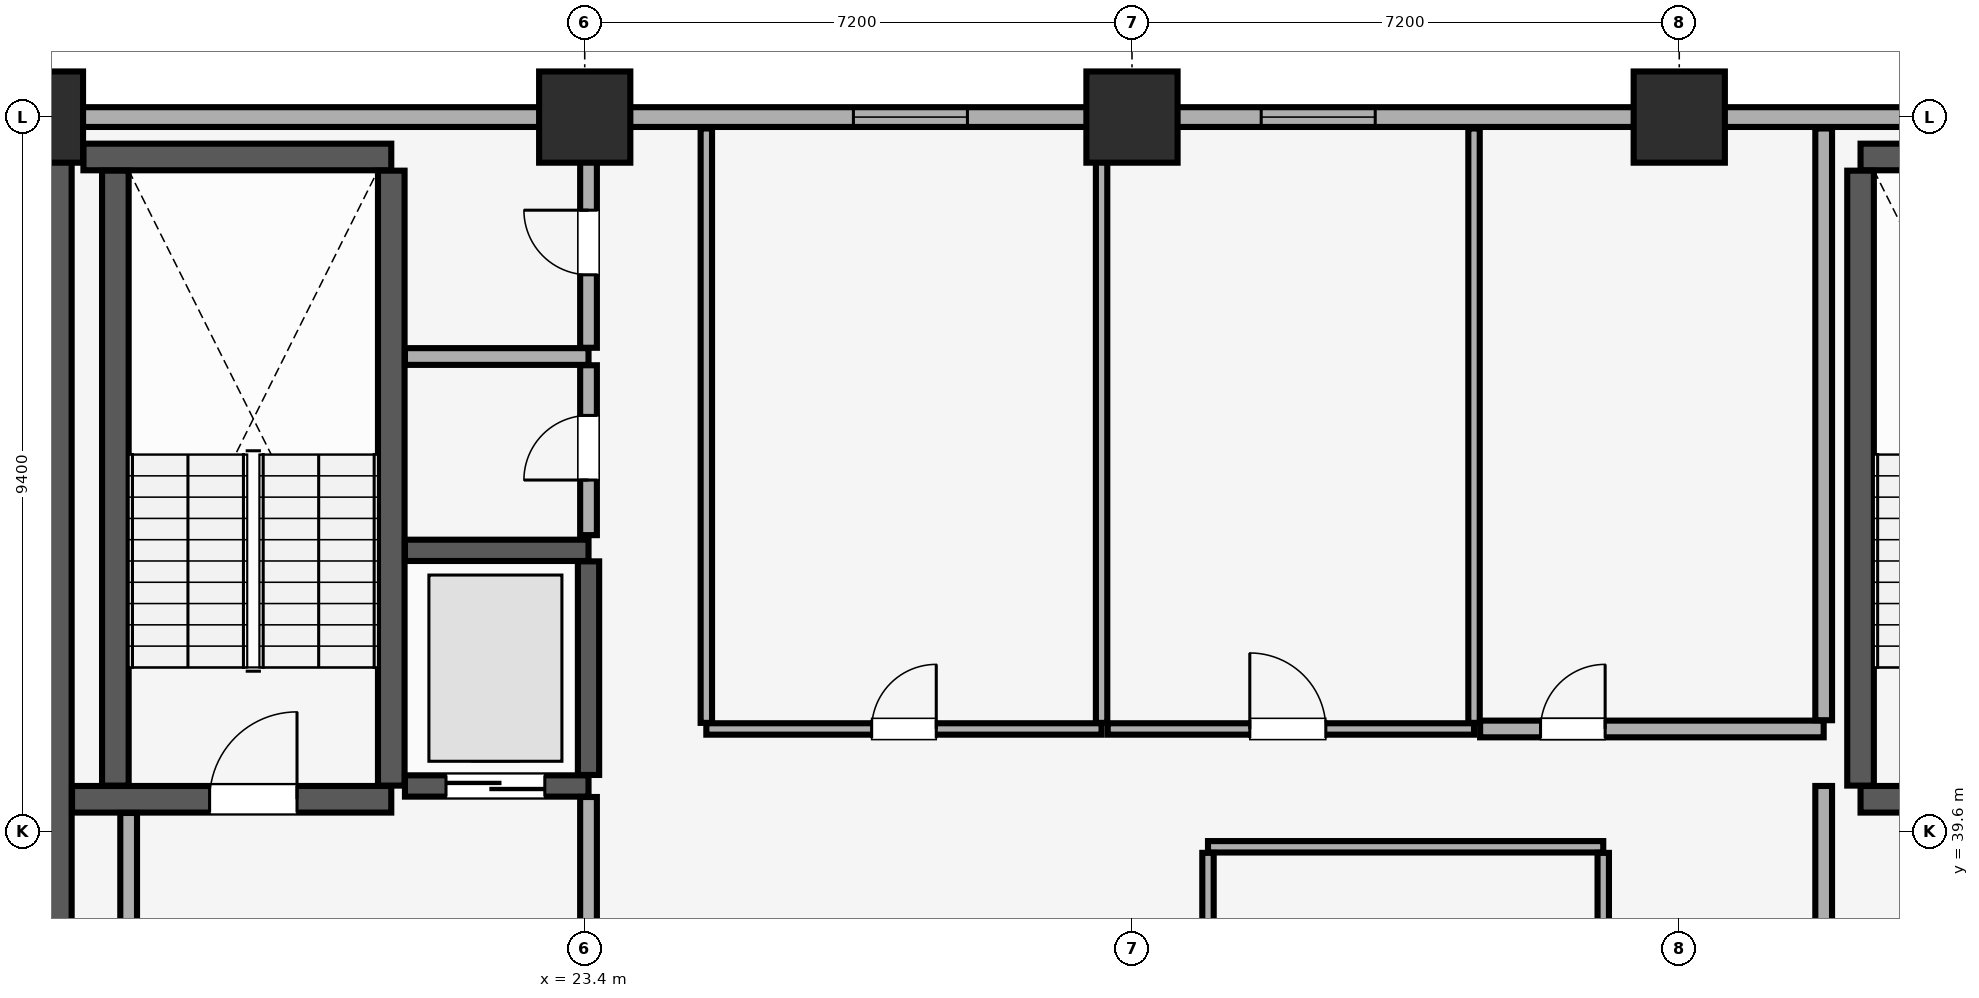
"""IFC4 building model, lengths in metres.
Left out: names, types, materials, properties, quantities, classifications, styles, units other than length and angle.
Written with IfcOpenShell. Run it as: python <this file> out.ifc"""

import sys

from ifc_helpers import new_model, si_unit, direction, frame, frame_2d, origin, origin_2d, place, context, subcontext, project, spatial, rectangle, extrude, element, fill, save


model = new_model("IFC4")
c1 = context("Model", 3, precision=1e-05, world=origin(), true_north=direction((0.0, 1.0)))
c2 = subcontext(c1, "Body", "Model", "MODEL_VIEW")
j1 = project(units=[si_unit("LENGTHUNIT", "METRE"), si_unit("PLANEANGLEUNIT", "RADIAN")], contexts=[c1])
p1 = place(None, origin())
s1 = spatial("IfcSite", under=j1, at=p1, CompositionType="ELEMENT")
p2 = place(p1, origin())
s2 = spatial("IfcBuilding", under=s1, at=p2, CompositionType="ELEMENT")
p3 = place(p2, frame((0.0, 0.0, 104.3)))
s3 = spatial("IfcBuildingStorey", under=s2, at=p3, CompositionType="ELEMENT", Elevation=104.3)
for number, where, z_axis, x_axis in (
    (1, (16.2, 49.0, 0.0), (0.0, 0.0, 1.0), (1.0, 0.0, 0.0)),
    (2, (23.4, 49.0, 0.0), (0.0, 0.0, 1.0), (1.0, 0.0, 0.0)),
    (3, (30.6, 49.0, 0.0), (0.0, 0.0, 1.0), (1.0, 0.0, 0.0)),
    (4, (37.8, 49.0, 0.0), (0.0, 0.0, 1.0), (1.0, 0.0, 0.0)),
):
    element("IfcColumn", number, at=place(p3, frame(where, z_axis=z_axis, x_axis=x_axis)), inside=s3, PredefinedType="COLUMN", context=c2, shape_type="SweptSolid", body=[
        extrude(rectangle(XDim=1.2, YDim=1.2, at=origin_2d()), origin(), (0.0, 0.0, 1.0), 3.51),
    ])
p4 = place(p3, frame((79.8, 49.0, 0.0), z_axis=(0.0, 0.0, 1.0), x_axis=(-1.0, 0.0, 0.0)))
e5 = element("IfcWall", 5, at=p4, inside=s3, PredefinedType="SOLIDWALL", context=c2, shape_type="SweptSolid", body=[
    extrude(rectangle(XDim=75.6, YDim=0.26, at=frame_2d((37.8, 0.0))), origin(), (0.0, 0.0, 1.0), 2.56),
])
p5 = place(p4, frame((72.565, 0.0, 0.85)))
e6 = element("IfcOpeningElement", 6, at=p5, cuts=e5, PredefinedType="OPENING", context=c2, shape_type="SweptSolid", body=[
    extrude(rectangle(XDim=1.5, YDim=1.4, at=frame_2d((0.75, 0.7))), frame((0.0, 0.14, 0.0), z_axis=(0.0, -1.0, 0.0), x_axis=(1.0, 0.0, 0.0)), (0.0, 0.0, 1.0), 0.28),
])
p6 = place(p4, frame((67.45, 0.0, 0.85)))
e7 = element("IfcOpeningElement", 7, at=p6, cuts=e5, PredefinedType="OPENING", context=c2, shape_type="SweptSolid", body=[
    extrude(rectangle(XDim=1.5, YDim=1.4, at=frame_2d((0.75, 0.7))), frame((0.0, 0.14, 0.0), z_axis=(0.0, -1.0, 0.0), x_axis=(1.0, 0.0, 0.0)), (0.0, 0.0, 1.0), 0.28),
])
p7 = place(p4, frame((6.65, 0.0, 0.85)))
e8 = element("IfcOpeningElement", 8, at=p7, cuts=e5, PredefinedType="OPENING", context=c2, shape_type="SweptSolid", body=[
    extrude(rectangle(XDim=1.5, YDim=1.4, at=frame_2d((0.75, 0.7))), frame((0.0, 0.14, 0.0), z_axis=(0.0, -1.0, 0.0), x_axis=(1.0, 0.0, 0.0)), (0.0, 0.0, 1.0), 0.28),
])
p8 = place(p4, frame((1.535, 0.0, 0.85)))
e9 = element("IfcOpeningElement", 9, at=p8, cuts=e5, PredefinedType="OPENING", context=c2, shape_type="SweptSolid", body=[
    extrude(rectangle(XDim=1.5, YDim=1.4, at=frame_2d((0.75, 0.7))), frame((0.0, 0.14, 0.0), z_axis=(0.0, -1.0, 0.0), x_axis=(1.0, 0.0, 0.0)), (0.0, 0.0, 1.0), 0.28),
])
p9 = place(p4, frame((51.365, 0.0, 0.9)))
e10 = element("IfcOpeningElement", 10, at=p9, cuts=e5, PredefinedType="OPENING", context=c2, shape_type="SweptSolid", body=[
    extrude(rectangle(XDim=1.5, YDim=1.4, at=frame_2d((0.75, 0.7))), frame((0.0, 0.14, 0.0), z_axis=(0.0, -1.0, 0.0), x_axis=(1.0, 0.0, 0.0)), (0.0, 0.0, 1.0), 0.28),
])
p10 = place(p4, frame((46.0, 0.0, 0.9)))
e11 = element("IfcOpeningElement", 11, at=p10, cuts=e5, PredefinedType="OPENING", context=c2, shape_type="SweptSolid", body=[
    extrude(rectangle(XDim=1.5, YDim=1.4, at=frame_2d((0.75, 0.7))), frame((0.0, 0.14, 0.0), z_axis=(0.0, -1.0, 0.0), x_axis=(1.0, 0.0, 0.0)), (0.0, 0.0, 1.0), 0.28),
])
p11 = place(p4, frame((29.15, 0.0, 0.9)))
e12 = element("IfcOpeningElement", 12, at=p11, cuts=e5, PredefinedType="OPENING", context=c2, shape_type="SweptSolid", body=[
    extrude(rectangle(XDim=1.5, YDim=1.4, at=frame_2d((0.75, 0.7))), frame((0.0, 0.14, 0.0), z_axis=(0.0, -1.0, 0.0), x_axis=(1.0, 0.0, 0.0)), (0.0, 0.0, 1.0), 0.28),
])
p12 = place(p4, frame((23.485, 0.0, 0.9)))
e13 = element("IfcOpeningElement", 13, at=p12, cuts=e5, PredefinedType="OPENING", context=c2, shape_type="SweptSolid", body=[
    extrude(rectangle(XDim=1.5, YDim=1.4, at=frame_2d((0.75, 0.7))), frame((0.0, 0.14, 0.0), z_axis=(0.0, -1.0, 0.0), x_axis=(1.0, 0.0, 0.0)), (0.0, 0.0, 1.0), 0.28),
])
p13 = place(p3, frame((16.2, 29.4, 0.0), z_axis=(0.0, 0.0, 1.0), x_axis=(0.0, 1.0, 0.0)))
e14 = element("IfcWall", 14, at=p13, inside=s3, PredefinedType="SHEAR", context=c2, shape_type="SweptSolid", body=[
    extrude(rectangle(XDim=19.2, YDim=0.9, at=frame_2d((9.6, 0.0))), origin(), (0.0, 0.0, 1.0), 3.51),
])
p14 = place(p3, frame((16.655, 40.025, 0.0), z_axis=(0.0, 0.0, 1.0), x_axis=(1.0, 0.0, 0.0)))
e15 = element("IfcWall", 15, at=p14, inside=s3, PredefinedType="SHEAR", context=c2, shape_type="SweptSolid", body=[
    extrude(rectangle(XDim=4.2, YDim=0.35, at=frame_2d((2.1, 0.0))), origin(), (0.0, 0.0, 1.0), 3.51),
])
p15 = place(p14, frame((1.81, 0.0, 0.0)))
e16 = element("IfcOpeningElement", 16, at=p15, cuts=e15, PredefinedType="OPENING", context=c2, shape_type="SweptSolid", body=[
    extrude(rectangle(XDim=1.15, YDim=2.15, at=frame_2d((0.575, 1.075))), frame((0.0, 0.185, 0.0), z_axis=(0.0, -1.0, 0.0), x_axis=(1.0, 0.0, 0.0)), (0.0, 0.0, 1.0), 0.37),
])
p16 = place(p3, frame((16.805, 48.475, 0.0), z_axis=(0.0, 0.0, 1.0), x_axis=(1.0, 0.0, 0.0)))
e17 = element("IfcWall", 17, at=p16, inside=s3, PredefinedType="SHEAR", context=c2, shape_type="SweptSolid", body=[
    extrude(rectangle(XDim=4.05, YDim=0.35, at=frame_2d((2.025, 0.0))), origin(), (0.0, 0.0, 1.0), 3.51),
])
for number, where, z_axis, x_axis in (
    (18, (17.225, 40.205, 0.0), (0.0, 0.0, 1.0), (0.0, 1.0, 0.0)),
    (19, (20.855, 40.205, 0.0), (0.0, 0.0, 1.0), (0.0, 1.0, 0.0)),
):
    element("IfcWall", number, at=place(p3, frame(where, z_axis=z_axis, x_axis=x_axis)), inside=s3, PredefinedType="SHEAR", context=c2, shape_type="SweptSolid", body=[
        extrude(rectangle(XDim=8.09, YDim=0.35, at=frame_2d((4.045, 0.0))), origin(), (0.0, 0.0, 1.0), 3.51),
    ])
p17 = place(p3, frame((40.185, 40.025, 0.0), z_axis=(0.0, 0.0, 1.0), x_axis=(1.0, 0.0, 0.0)))
e20 = element("IfcWall", 20, at=p17, inside=s3, PredefinedType="SHEAR", context=c2, shape_type="SweptSolid", body=[
    extrude(rectangle(XDim=3.63, YDim=0.35, at=frame_2d((1.815, 0.0))), origin(), (0.0, 0.0, 1.0), 3.51),
])
p18 = place(p17, frame((1.24, 0.0, 0.0)))
e21 = element("IfcOpeningElement", 21, at=p18, cuts=e20, PredefinedType="OPENING", context=c2, shape_type="SweptSolid", body=[
    extrude(rectangle(XDim=1.15, YDim=2.15, at=frame_2d((0.575, 1.075))), frame((0.0, 0.185, 0.0), z_axis=(0.0, -1.0, 0.0), x_axis=(1.0, 0.0, 0.0)), (0.0, 0.0, 1.0), 0.37),
])
p19 = place(p3, frame((40.185, 48.475, 0.0), z_axis=(0.0, 0.0, 1.0), x_axis=(1.0, 0.0, 0.0)))
e22 = element("IfcWall", 22, at=p19, inside=s3, PredefinedType="SHEAR", context=c2, shape_type="SweptSolid", body=[
    extrude(rectangle(XDim=3.63, YDim=0.35, at=frame_2d((1.815, 0.0))), origin(), (0.0, 0.0, 1.0), 3.51),
])
p20 = place(p3, frame((40.185, 40.205, 0.0), z_axis=(0.0, 0.0, 1.0), x_axis=(0.0, 1.0, 0.0)))
e23 = element("IfcWall", 23, at=p20, inside=s3, PredefinedType="SHEAR", context=c2, shape_type="SweptSolid", body=[
    extrude(rectangle(XDim=8.09, YDim=0.35, at=frame_2d((4.045, 0.0))), origin(), (0.0, 0.0, 1.0), 3.51),
])
p21 = place(p3, frame((21.035, 40.2, 0.0), z_axis=(0.0, 0.0, 1.0), x_axis=(1.0, 0.0, 0.0)))
e24 = element("IfcWall", 24, at=p21, inside=s3, PredefinedType="SHEAR", context=c2, shape_type="SweptSolid", body=[
    extrude(rectangle(XDim=2.415, YDim=0.28, at=frame_2d((1.208, 0.0))), origin(), (0.0, 0.0, 1.0), 3.51),
])
p22 = place(p21, frame((0.54, 0.0, 0.0)))
e25 = element("IfcOpeningElement", 25, at=p22, cuts=e24, PredefinedType="OPENING", context=c2, shape_type="SweptSolid", body=[
    extrude(rectangle(XDim=1.3, YDim=2.3, at=frame_2d((0.65, 1.15))), frame((0.0, 0.15, 0.0), z_axis=(0.0, -1.0, 0.0), x_axis=(1.0, 0.0, 0.0)), (0.0, 0.0, 1.0), 0.3),
])
p23 = place(p3, frame((21.035, 43.3, 0.0), z_axis=(0.0, 0.0, 1.0), x_axis=(1.0, 0.0, 0.0)))
e26 = element("IfcWall", 26, at=p23, inside=s3, PredefinedType="SHEAR", context=c2, shape_type="SweptSolid", body=[
    extrude(rectangle(XDim=2.415, YDim=0.28, at=frame_2d((1.208, 0.0))), origin(), (0.0, 0.0, 1.0), 3.51),
])
p24 = place(p3, frame((23.45, 40.345, 0.0), z_axis=(0.0, 0.0, 1.0), x_axis=(0.0, 1.0, 0.0)))
e27 = element("IfcWall", 27, at=p24, inside=s3, PredefinedType="SHEAR", context=c2, shape_type="SweptSolid", body=[
    extrude(rectangle(XDim=2.81, YDim=0.28, at=frame_2d((1.405, 0.0))), origin(), (0.0, 0.0, 1.0), 3.51),
])
p25 = place(p3, frame((17.4, 34.415, 0.0), z_axis=(0.0, 0.0, 1.0), x_axis=(0.0, 1.0, 0.0)))
e28 = element("IfcWall", 28, at=p25, inside=s3, PredefinedType="PARTITIONING", context=c2, shape_type="SweptSolid", body=[
    extrude(rectangle(XDim=5.43, YDim=0.22, at=frame_2d((2.715, 0.0))), origin(), (0.0, 0.0, 1.0), 3.51),
])
p26 = place(p3, frame((23.45, 34.415, 0.0), z_axis=(0.0, 0.0, 1.0), x_axis=(0.0, 1.0, 0.0)))
e29 = element("IfcWall", 29, at=p26, inside=s3, PredefinedType="PARTITIONING", context=c2, shape_type="SweptSolid", body=[
    extrude(rectangle(XDim=5.64, YDim=0.22, at=frame_2d((2.82, 0.0))), origin(), (0.0, 0.0, 1.0), 3.51),
])
p27 = place(p3, frame((39.7, 34.415, 0.0), z_axis=(0.0, 0.0, 1.0), x_axis=(0.0, 1.0, 0.0)))
e30 = element("IfcWall", 30, at=p27, inside=s3, PredefinedType="PARTITIONING", context=c2, shape_type="SweptSolid", body=[
    extrude(rectangle(XDim=5.785, YDim=0.22, at=frame_2d((2.893, 0.0))), origin(), (0.0, 0.0, 1.0), 3.51),
])
p28 = place(p3, frame((21.035, 45.85, 0.0), z_axis=(0.0, 0.0, 1.0), x_axis=(1.0, 0.0, 0.0)))
e31 = element("IfcWall", 31, at=p28, inside=s3, PredefinedType="PARTITIONING", context=c2, shape_type="SweptSolid", body=[
    extrude(rectangle(XDim=2.415, YDim=0.22, at=frame_2d((1.208, 0.0))), origin(), (0.0, 0.0, 1.0), 3.51),
])
p29 = place(p3, frame((23.45, 43.5, 0.0), z_axis=(0.0, 0.0, 1.0), x_axis=(0.0, 1.0, 0.0)))
e32 = element("IfcWall", 32, at=p29, inside=s3, PredefinedType="PARTITIONING", context=c2, shape_type="SweptSolid", body=[
    extrude(rectangle(XDim=2.235, YDim=0.22, at=frame_2d((1.118, 0.0))), origin(), (0.0, 0.0, 1.0), 3.51),
])
p30 = place(p29, frame((0.725, 0.0, 0.0)))
e33 = element("IfcOpeningElement", 33, at=p30, cuts=e32, PredefinedType="OPENING", context=c2, shape_type="SweptSolid", body=[
    extrude(rectangle(XDim=0.85, YDim=2.1, at=frame_2d((0.425, 1.05))), frame((0.0, 0.12, 0.0), z_axis=(0.0, -1.0, 0.0), x_axis=(1.0, 0.0, 0.0)), (0.0, 0.0, 1.0), 0.24),
])
p31 = place(p3, frame((23.45, 45.965, 0.0), z_axis=(0.0, 0.0, 1.0), x_axis=(0.0, 1.0, 0.0)))
e34 = element("IfcWall", 34, at=p31, inside=s3, PredefinedType="PARTITIONING", context=c2, shape_type="SweptSolid", body=[
    extrude(rectangle(XDim=2.885, YDim=0.22, at=frame_2d((1.442, 0.0))), origin(), (0.0, 0.0, 1.0), 3.51),
])
p32 = place(p31, frame((0.96, 0.0, 0.0)))
e35 = element("IfcOpeningElement", 35, at=p32, cuts=e34, PredefinedType="OPENING", context=c2, shape_type="SweptSolid", body=[
    extrude(rectangle(XDim=0.85, YDim=2.1, at=frame_2d((0.425, 1.05))), frame((0.0, 0.12, 0.0), z_axis=(0.0, -1.0, 0.0), x_axis=(1.0, 0.0, 0.0)), (0.0, 0.0, 1.0), 0.24),
])
p33 = place(p3, frame((31.6, 39.4, 0.0), z_axis=(0.0, 0.0, 1.0), x_axis=(1.0, 0.0, 0.0)))
e36 = element("IfcWall", 36, at=p33, inside=s3, PredefinedType="PARTITIONING", context=c2, shape_type="SweptSolid", body=[
    extrude(rectangle(XDim=5.2, YDim=0.15, at=frame_2d((2.6, 0.0))), origin(), (0.0, 0.0, 1.0), 3.51),
])
for number, where, z_axis, x_axis in (
    (37, (31.6, 34.38, 0.0), (0.0, 0.0, 1.0), (0.0, 1.0, 0.0)),
    (38, (36.8, 34.38, 0.0), (0.0, 0.0, 1.0), (0.0, 1.0, 0.0)),
):
    element("IfcWall", number, at=place(p3, frame(where, z_axis=z_axis, x_axis=x_axis)), inside=s3, PredefinedType="PARTITIONING", context=c2, shape_type="SweptSolid", body=[
        extrude(rectangle(XDim=4.94, YDim=0.15, at=frame_2d((2.47, 0.0))), origin(), (0.0, 0.0, 1.0), 3.51),
    ])
p34 = place(p3, frame((25.0, 40.95, 0.0), z_axis=(0.0, 0.0, 1.0), x_axis=(1.0, 0.0, 0.0)))
e39 = element("IfcWall", 39, at=p34, inside=s3, PredefinedType="PARTITIONING", context=c2, shape_type="SweptSolid", body=[
    extrude(rectangle(XDim=5.2, YDim=0.15, at=frame_2d((2.6, 0.0))), origin(), (0.0, 0.0, 1.0), 3.51),
])
p35 = place(p34, frame((2.175, 0.0, 0.0)))
e40 = element("IfcOpeningElement", 40, at=p35, cuts=e39, PredefinedType="OPENING", context=c2, shape_type="SweptSolid", body=[
    extrude(rectangle(XDim=0.85, YDim=2.1, at=frame_2d((0.425, 1.05))), frame((0.0, 0.085, 0.0), z_axis=(0.0, -1.0, 0.0), x_axis=(1.0, 0.0, 0.0)), (0.0, 0.0, 1.0), 0.17),
])
for number, where, z_axis, x_axis in (
    (41, (25.0, 41.03, 0.0), (0.0, 0.0, 1.0), (0.0, 1.0, 0.0)),
    (42, (30.2, 41.03, 0.0), (0.0, 0.0, 1.0), (0.0, 1.0, 0.0)),
):
    element("IfcWall", number, at=place(p3, frame(where, z_axis=z_axis, x_axis=x_axis)), inside=s3, PredefinedType="PARTITIONING", context=c2, shape_type="SweptSolid", body=[
        extrude(rectangle(XDim=7.82, YDim=0.15, at=frame_2d((3.91, 0.0))), origin(), (0.0, 0.0, 1.0), 3.51),
    ])
p36 = place(p3, frame((30.28, 40.95, 0.0), z_axis=(0.0, 0.0, 1.0), x_axis=(1.0, 0.0, 0.0)))
e43 = element("IfcWall", 43, at=p36, inside=s3, PredefinedType="PARTITIONING", context=c2, shape_type="SweptSolid", body=[
    extrude(rectangle(XDim=4.82, YDim=0.15, at=frame_2d((2.41, 0.0))), origin(), (0.0, 0.0, 1.0), 3.51),
])
p37 = place(p36, frame((1.87, 0.0, 0.0)))
e44 = element("IfcOpeningElement", 44, at=p37, cuts=e43, PredefinedType="OPENING", context=c2, shape_type="SweptSolid", body=[
    extrude(rectangle(XDim=1.0, YDim=2.15, at=frame_2d((0.5, 1.075))), frame((0.0, 0.085, 0.0), z_axis=(0.0, -1.0, 0.0), x_axis=(1.0, 0.0, 0.0)), (0.0, 0.0, 1.0), 0.17),
])
p38 = place(p3, frame((35.1, 41.03, 0.0), z_axis=(0.0, 0.0, 1.0), x_axis=(0.0, 1.0, 0.0)))
e45 = element("IfcWall", 45, at=p38, inside=s3, PredefinedType="PARTITIONING", context=c2, shape_type="SweptSolid", body=[
    extrude(rectangle(XDim=7.82, YDim=0.15, at=frame_2d((3.91, 0.0))), origin(), (0.0, 0.0, 1.0), 3.51),
])
p39 = place(p3, frame((35.18, 40.95, 0.0), z_axis=(0.0, 0.0, 1.0), x_axis=(1.0, 0.0, 0.0)))
e46 = element("IfcWall", 46, at=p39, inside=s3, PredefinedType="PARTITIONING", context=c2, shape_type="SweptSolid", body=[
    extrude(rectangle(XDim=4.52, YDim=0.22, at=frame_2d((2.26, 0.0))), origin(), (0.0, 0.0, 1.0), 3.51),
])
p40 = place(p39, frame((0.795, 0.0, 0.0)))
e47 = element("IfcOpeningElement", 47, at=p40, cuts=e46, PredefinedType="OPENING", context=c2, shape_type="SweptSolid", body=[
    extrude(rectangle(XDim=0.85, YDim=2.1, at=frame_2d((0.425, 1.05))), frame((0.0, 0.12, 0.0), z_axis=(0.0, -1.0, 0.0), x_axis=(1.0, 0.0, 0.0)), (0.0, 0.0, 1.0), 0.24),
])
p41 = place(p3, frame((39.7, 41.065, 0.0), z_axis=(0.0, 0.0, 1.0), x_axis=(0.0, 1.0, 0.0)))
e48 = element("IfcWall", 48, at=p41, inside=s3, PredefinedType="PARTITIONING", context=c2, shape_type="SweptSolid", body=[
    extrude(rectangle(XDim=7.785, YDim=0.22, at=frame_2d((3.893, 0.0))), origin(), (0.0, 0.0, 1.0), 3.51),
])
p42 = place(p9, origin())
e49 = element("IfcWindow", 49, at=p42, inside=s3, PartitioningType="SINGLE_PANEL", PredefinedType="WINDOW", context=c2, shape_type="SweptSolid", body=[
    extrude(rectangle(XDim=1.5, YDim=1.4, at=frame_2d((0.75, 0.7))), frame((0.0, 0.03, 0.0), z_axis=(0.0, -1.0, 0.0), x_axis=(1.0, 0.0, 0.0)), (0.0, 0.0, 1.0), 0.06),
])
fill(e10, e49)
p43 = place(p10, origin())
e50 = element("IfcWindow", 50, at=p43, inside=s3, PartitioningType="SINGLE_PANEL", PredefinedType="WINDOW", context=c2, shape_type="SweptSolid", body=[
    extrude(rectangle(XDim=1.5, YDim=1.4, at=frame_2d((0.75, 0.7))), frame((0.0, 0.03, 0.0), z_axis=(0.0, -1.0, 0.0), x_axis=(1.0, 0.0, 0.0)), (0.0, 0.0, 1.0), 0.06),
])
fill(e11, e50)
p44 = place(p15, origin())
e51 = element("IfcDoor", 51, at=p44, inside=s3, OperationType="SINGLE_SWING_RIGHT", PredefinedType="DOOR", context=c2, shape_type="SweptSolid", body=[
    extrude(rectangle(XDim=1.15, YDim=2.15, at=frame_2d((0.575, 1.075))), frame((0.0, 0.025, 0.0), z_axis=(0.0, -1.0, 0.0), x_axis=(1.0, 0.0, 0.0)), (0.0, 0.0, 1.0), 0.05),
])
fill(e16, e51)
p45 = place(p22, origin())
e52 = element("IfcDoor", 52, at=p45, inside=s3, OperationType="DOUBLE_DOOR_SLIDING", PredefinedType="DOOR", context=c2, shape_type="SweptSolid", body=[
    extrude(rectangle(XDim=1.3, YDim=2.3, at=frame_2d((0.65, 1.15))), frame((0.0, 0.025, 0.0), z_axis=(0.0, -1.0, 0.0), x_axis=(1.0, 0.0, 0.0)), (0.0, 0.0, 1.0), 0.05),
])
fill(e25, e52)
p46 = place(p30, origin())
e53 = element("IfcDoor", 53, at=p46, inside=s3, OperationType="SINGLE_SWING_LEFT", PredefinedType="DOOR", context=c2, shape_type="SweptSolid", body=[
    extrude(rectangle(XDim=0.85, YDim=2.1, at=frame_2d((0.425, 1.05))), frame((0.0, 0.025, 0.0), z_axis=(0.0, -1.0, 0.0), x_axis=(1.0, 0.0, 0.0)), (0.0, 0.0, 1.0), 0.05),
])
fill(e33, e53)
p47 = place(p32, origin())
e54 = element("IfcDoor", 54, at=p47, inside=s3, OperationType="SINGLE_SWING_RIGHT", PredefinedType="DOOR", context=c2, shape_type="SweptSolid", body=[
    extrude(rectangle(XDim=0.85, YDim=2.1, at=frame_2d((0.425, 1.05))), frame((0.0, 0.025, 0.0), z_axis=(0.0, -1.0, 0.0), x_axis=(1.0, 0.0, 0.0)), (0.0, 0.0, 1.0), 0.05),
])
fill(e35, e54)
p48 = place(p35, origin())
e55 = element("IfcDoor", 55, at=p48, inside=s3, OperationType="SINGLE_SWING_RIGHT", PredefinedType="DOOR", context=c2, shape_type="SweptSolid", body=[
    extrude(rectangle(XDim=0.85, YDim=2.1, at=frame_2d((0.425, 1.05))), frame((0.0, 0.025, 0.0), z_axis=(0.0, -1.0, 0.0), x_axis=(1.0, 0.0, 0.0)), (0.0, 0.0, 1.0), 0.05),
])
fill(e40, e55)
p49 = place(p37, origin())
e56 = element("IfcDoor", 56, at=p49, inside=s3, OperationType="SINGLE_SWING_LEFT", PredefinedType="DOOR", context=c2, shape_type="SweptSolid", body=[
    extrude(rectangle(XDim=1.0, YDim=2.15, at=frame_2d((0.5, 1.075))), frame((0.0, 0.025, 0.0), z_axis=(0.0, -1.0, 0.0), x_axis=(1.0, 0.0, 0.0)), (0.0, 0.0, 1.0), 0.05),
])
fill(e44, e56)
p50 = place(p40, origin())
e57 = element("IfcDoor", 57, at=p50, inside=s3, OperationType="SINGLE_SWING_RIGHT", PredefinedType="DOOR", context=c2, shape_type="SweptSolid", body=[
    extrude(rectangle(XDim=0.85, YDim=2.1, at=frame_2d((0.425, 1.05))), frame((0.0, 0.025, 0.0), z_axis=(0.0, -1.0, 0.0), x_axis=(1.0, 0.0, 0.0)), (0.0, 0.0, 1.0), 0.05),
])
fill(e47, e57)
save(model, sys.argv[1])
